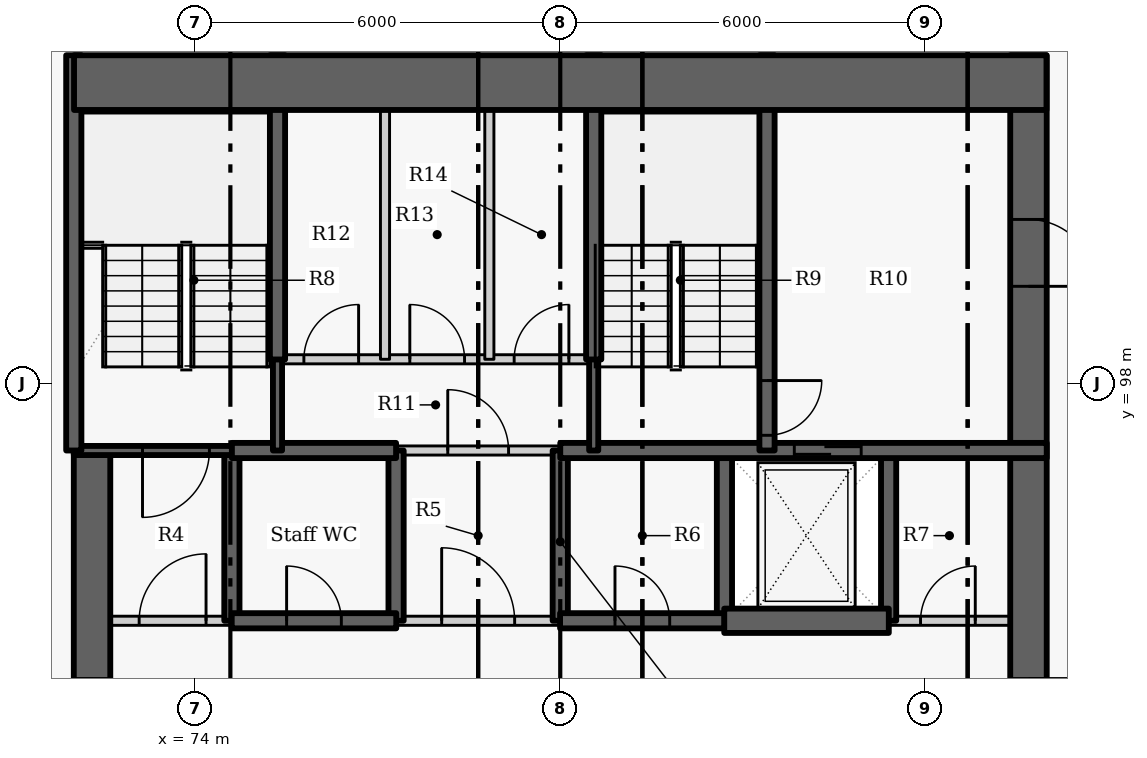
"""IFC4 building model, lengths in metres.
Left out: names, types, materials, properties, quantities, classifications, styles, units other than length and angle.
Written with IfcOpenShell. Run it as: python <this file> out.ifc"""

import sys

from ifc_helpers import new_model, si_unit, direction, frame, frame_2d, origin, place, context, subcontext, project, spatial, rectangle, extrude, element, fill, save


model = new_model("IFC4")
c1 = context("Model", 3, precision=1e-05, world=origin(), true_north=direction((0.0, 1.0)))
c2 = subcontext(c1, "Body", "Model", "MODEL_VIEW")
j1 = project(units=[si_unit("LENGTHUNIT", "METRE"), si_unit("PLANEANGLEUNIT", "RADIAN")], contexts=[c1])
p1 = place(None, origin())
s1 = spatial("IfcSite", under=j1, at=p1, CompositionType="ELEMENT")
p2 = place(p1, origin())
s2 = spatial("IfcBuilding", under=s1, at=p2, CompositionType="ELEMENT")
p3 = place(p2, frame((0.0, 0.0, 28.2)))
s3 = spatial("IfcBuildingStorey", under=s2, at=p3, CompositionType="ELEMENT", Elevation=28.2)
p4 = place(p3, frame((74.6, 94.1, -0.275), z_axis=(0.0, 0.0, 1.0), x_axis=(0.0, 1.0, 0.0)))
e1 = element("IfcWall", 1, at=p4, inside=s3, PredefinedType="SHEAR", context=c2, shape_type="SweptSolid", body=[
    extrude(rectangle(XDim=2.8, YDim=0.25, at=frame_2d((1.4, 0.0))), origin(), (0.0, 0.0, 1.0), 3.3),
])
p5 = place(p3, frame((72.3, 87.8, -0.275), z_axis=(0.0, 0.0, 1.0), x_axis=(0.0, 1.0, 0.0)))
e2 = element("IfcWall", 2, at=p5, inside=s3, PredefinedType="SHEAR", context=c2, shape_type="SweptSolid", body=[
    extrude(rectangle(XDim=9.1, YDim=0.6, at=frame_2d((4.55, 0.0))), origin(), (0.0, 0.0, 1.0), 3.3),
])
p6 = place(p5, frame((3.85, 0.0, 0.275)))
e3 = element("IfcOpeningElement", 3, at=p6, cuts=e2, PredefinedType="OPENING", context=c2, shape_type="SweptSolid", body=[
    extrude(rectangle(XDim=1.5, YDim=2.1, at=frame_2d((0.75, 1.05))), frame((0.0, 0.31, 0.0), z_axis=(0.0, -1.0, 0.0), x_axis=(1.0, 0.0, 0.0)), (0.0, 0.0, 1.0), 0.62),
])
for number, where, z_axis, x_axis in (
    (4, (77.3, 94.1, -0.275), (0.0, 0.0, 1.0), (0.0, 1.0, 0.0)),
    (5, (80.0, 94.1, -0.275), (0.0, 0.0, 1.0), (0.0, 1.0, 0.0)),
    (6, (82.7, 94.1, -0.275), (0.0, 0.0, 1.0), (0.0, 1.0, 0.0)),
    (7, (85.4, 94.1, -0.275), (0.0, 0.0, 1.0), (0.0, 1.0, 0.0)),
):
    element("IfcWall", number, at=place(p3, frame(where, z_axis=z_axis, x_axis=x_axis)), inside=s3, PredefinedType="SHEAR", context=c2, shape_type="SweptSolid", body=[
        extrude(rectangle(XDim=2.8, YDim=0.25, at=frame_2d((1.4, 0.0))), origin(), (0.0, 0.0, 1.0), 3.3),
    ])
p7 = place(p3, frame((87.7, 103.4, -0.275), z_axis=(0.0, 0.0, 1.0), x_axis=(0.0, -1.0, 0.0)))
e8 = element("IfcWall", 8, at=p7, inside=s3, PredefinedType="SHEAR", context=c2, shape_type="SweptSolid", body=[
    extrude(rectangle(XDim=15.6, YDim=0.6, at=frame_2d((7.8, 0.0))), origin(), (0.0, 0.0, 1.0), 3.3),
])
p8 = place(p7, frame((10.25, 0.0, 0.275)))
e9 = element("IfcOpeningElement", 9, at=p8, cuts=e8, PredefinedType="OPENING", context=c2, shape_type="SweptSolid", body=[
    extrude(rectangle(XDim=1.5, YDim=2.1, at=frame_2d((0.75, 1.05))), frame((0.0, 0.31, 0.0), z_axis=(0.0, -1.0, 0.0), x_axis=(1.0, 0.0, 0.0)), (0.0, 0.0, 1.0), 0.62),
])
p9 = place(p7, frame((2.7, 0.0, 0.275)))
e10 = element("IfcOpeningElement", 10, at=p9, cuts=e8, PredefinedType="OPENING", context=c2, shape_type="SweptSolid", body=[
    extrude(rectangle(XDim=1.1, YDim=2.1, at=frame_2d((0.55, 1.05))), frame((0.0, 0.31, 0.0), z_axis=(0.0, -1.0, 0.0), x_axis=(1.0, 0.0, 0.0)), (0.0, 0.0, 1.0), 0.62),
])
p10 = place(p3, frame((72.0, 94.1, 0.0), z_axis=(0.0, 0.0, 1.0), x_axis=(1.0, 0.0, 0.0)))
e11 = element("IfcWall", 11, at=p10, inside=s3, PredefinedType="PARTITIONING", context=c2, shape_type="SweptSolid", body=[
    extrude(rectangle(XDim=2.603, YDim=0.15, at=frame_2d((1.302, 0.0))), origin(), (0.0, 0.0, 1.0), 3.025),
])
p11 = place(p10, frame((1.075, 0.0, 0.0)))
e12 = element("IfcOpeningElement", 12, at=p11, cuts=e11, PredefinedType="OPENING", context=c2, shape_type="SweptSolid", body=[
    extrude(rectangle(XDim=1.1, YDim=2.1, at=frame_2d((0.55, 1.05))), frame((0.0, 0.085, 0.0), z_axis=(0.0, -1.0, 0.0), x_axis=(1.0, 0.0, 0.0)), (0.0, 0.0, 1.0), 0.17),
])
p12 = place(p3, frame((77.297, 94.1, 0.0), z_axis=(0.0, 0.0, 1.0), x_axis=(1.0, 0.0, 0.0)))
e13 = element("IfcWall", 13, at=p12, inside=s3, PredefinedType="PARTITIONING", context=c2, shape_type="SweptSolid", body=[
    extrude(rectangle(XDim=2.706, YDim=0.15, at=frame_2d((1.353, 0.0))), origin(), (0.0, 0.0, 1.0), 3.025),
])
p13 = place(p12, frame((0.753, 0.0, 0.0)))
e14 = element("IfcOpeningElement", 14, at=p13, cuts=e13, PredefinedType="OPENING", context=c2, shape_type="SweptSolid", body=[
    extrude(rectangle(XDim=1.2, YDim=2.1, at=frame_2d((0.6, 1.05))), frame((0.0, 0.085, 0.0), z_axis=(0.0, -1.0, 0.0), x_axis=(1.0, 0.0, 0.0)), (0.0, 0.0, 1.0), 0.17),
])
p14 = place(p3, frame((85.397, 94.1, 0.0), z_axis=(0.0, 0.0, 1.0), x_axis=(1.0, 0.0, 0.0)))
e15 = element("IfcWall", 15, at=p14, inside=s3, PredefinedType="PARTITIONING", context=c2, shape_type="SweptSolid", body=[
    extrude(rectangle(XDim=2.603, YDim=0.15, at=frame_2d((1.302, 0.0))), origin(), (0.0, 0.0, 1.0), 3.025),
])
p15 = place(p14, frame((0.528, 0.0, 0.0)))
e16 = element("IfcOpeningElement", 16, at=p15, cuts=e15, PredefinedType="OPENING", context=c2, shape_type="SweptSolid", body=[
    extrude(rectangle(XDim=0.9, YDim=2.1, at=frame_2d((0.45, 1.05))), frame((0.0, 0.085, 0.0), z_axis=(0.0, -1.0, 0.0), x_axis=(1.0, 0.0, 0.0)), (0.0, 0.0, 1.0), 0.17),
])
p16 = place(p3, frame((74.597, 94.1, -0.275), z_axis=(0.0, 0.0, 1.0), x_axis=(1.0, 0.0, 0.0)))
e17 = element("IfcWall", 17, at=p16, inside=s3, PredefinedType="SHEAR", context=c2, shape_type="SweptSolid", body=[
    extrude(rectangle(XDim=2.706, YDim=0.25, at=frame_2d((1.353, 0.0))), origin(), (0.0, 0.0, 1.0), 3.3),
])
p17 = place(p16, frame((0.903, 0.0, 0.275)))
e18 = element("IfcOpeningElement", 18, at=p17, cuts=e17, PredefinedType="OPENING", context=c2, shape_type="SweptSolid", body=[
    extrude(rectangle(XDim=0.9, YDim=2.1, at=frame_2d((0.45, 1.05))), frame((0.0, 0.135, 0.0), z_axis=(0.0, -1.0, 0.0), x_axis=(1.0, 0.0, 0.0)), (0.0, 0.0, 1.0), 0.27),
])
p18 = place(p3, frame((79.997, 94.1, -0.275), z_axis=(0.0, 0.0, 1.0), x_axis=(1.0, 0.0, 0.0)))
e19 = element("IfcWall", 19, at=p18, inside=s3, PredefinedType="SHEAR", context=c2, shape_type="SweptSolid", body=[
    extrude(rectangle(XDim=2.706, YDim=0.25, at=frame_2d((1.353, 0.0))), origin(), (0.0, 0.0, 1.0), 3.3),
])
p19 = place(p18, frame((0.903, 0.0, 0.275)))
e20 = element("IfcOpeningElement", 20, at=p19, cuts=e19, PredefinedType="OPENING", context=c2, shape_type="SweptSolid", body=[
    extrude(rectangle(XDim=0.9, YDim=2.1, at=frame_2d((0.45, 1.05))), frame((0.0, 0.135, 0.0), z_axis=(0.0, -1.0, 0.0), x_axis=(1.0, 0.0, 0.0)), (0.0, 0.0, 1.0), 0.27),
])
p20 = place(p3, frame((82.697, 94.1, -0.275), z_axis=(0.0, 0.0, 1.0), x_axis=(1.0, 0.0, 0.0)))
e21 = element("IfcWall", 21, at=p20, inside=s3, PredefinedType="SHEAR", context=c2, shape_type="SweptSolid", body=[
    extrude(rectangle(XDim=2.706, YDim=0.4, at=frame_2d((1.353, 0.0))), origin(), (0.0, 0.0, 1.0), 3.3),
])
p21 = place(p3, frame((74.6, 96.9, -0.275), z_axis=(0.0, 0.0, 1.0), x_axis=(-1.0, 0.0, 0.0)))
e22 = element("IfcWall", 22, at=p21, inside=s3, PredefinedType="SHEAR", context=c2, shape_type="SweptSolid", body=[
    extrude(rectangle(XDim=2.6, YDim=0.15, at=frame_2d((1.3, 0.0))), origin(), (0.0, 0.0, 1.0), 3.3),
])
p22 = place(p21, frame((0.37, 0.0, 0.275)))
e23 = element("IfcOpeningElement", 23, at=p22, cuts=e22, PredefinedType="OPENING", context=c2, shape_type="SweptSolid", body=[
    extrude(rectangle(XDim=1.1, YDim=2.1, at=frame_2d((0.55, 1.05))), frame((0.0, 0.085, 0.0), z_axis=(0.0, -1.0, 0.0), x_axis=(1.0, 0.0, 0.0)), (0.0, 0.0, 1.0), 0.17),
])
p23 = place(p3, frame((74.6, 96.9, -0.275), z_axis=(0.0, 0.0, 1.0), x_axis=(1.0, 0.0, 0.0)))
e24 = element("IfcWall", 24, at=p23, inside=s3, PredefinedType="SHEAR", context=c2, shape_type="SweptSolid", body=[
    extrude(rectangle(XDim=2.7, YDim=0.25, at=frame_2d((1.35, 0.0))), origin(), (0.0, 0.0, 1.0), 3.3),
])
p24 = place(p3, frame((80.0, 96.9, -0.275), z_axis=(0.0, 0.0, 1.0), x_axis=(1.0, 0.0, 0.0)))
e25 = element("IfcWall", 25, at=p24, inside=s3, PredefinedType="SHEAR", context=c2, shape_type="SweptSolid", body=[
    extrude(rectangle(XDim=8.0, YDim=0.25, at=frame_2d((4.0, 0.0))), origin(), (0.0, 0.0, 1.0), 3.3),
])
p25 = place(p24, frame((3.849, 0.0, 0.275)))
e26 = element("IfcOpeningElement", 26, at=p25, cuts=e25, PredefinedType="OPENING", context=c2, shape_type="SweptSolid", body=[
    extrude(rectangle(XDim=1.1, YDim=2.1, at=frame_2d((0.55, 1.05))), frame((0.0, 0.135, 0.0), z_axis=(0.0, -1.0, 0.0), x_axis=(1.0, 0.0, 0.0)), (0.0, 0.0, 1.0), 0.27),
])
p26 = place(p3, frame((77.3, 96.9, 0.0), z_axis=(0.0, 0.0, 1.0), x_axis=(1.0, 0.0, 0.0)))
e27 = element("IfcWall", 27, at=p26, inside=s3, PredefinedType="PARTITIONING", context=c2, shape_type="SweptSolid", body=[
    extrude(rectangle(XDim=2.7, YDim=0.15, at=frame_2d((1.35, 0.0))), origin(), (0.0, 0.0, 1.0), 3.025),
])
p27 = place(p26, frame((0.85, 0.0, 0.0)))
e28 = element("IfcOpeningElement", 28, at=p27, cuts=e27, PredefinedType="OPENING", context=c2, shape_type="SweptSolid", body=[
    extrude(rectangle(XDim=1.0, YDim=2.1, at=frame_2d((0.5, 1.05))), frame((0.0, 0.085, 0.0), z_axis=(0.0, -1.0, 0.0), x_axis=(1.0, 0.0, 0.0)), (0.0, 0.0, 1.0), 0.17),
])
p28 = place(p3, frame((75.35, 96.9, -0.275), z_axis=(0.0, 0.0, 1.0), x_axis=(0.0, 1.0, 0.0)))
e29 = element("IfcWall", 29, at=p28, inside=s3, PredefinedType="SHEAR", context=c2, shape_type="SweptSolid", body=[
    extrude(rectangle(XDim=1.503, YDim=0.15, at=frame_2d((0.751, 0.0))), origin(), (0.0, 0.0, 1.0), 3.3),
])
p29 = place(p3, frame((75.35, 98.397, -0.275), z_axis=(0.0, 0.0, 1.0), x_axis=(0.0, 1.0, 0.0)))
e30 = element("IfcWall", 30, at=p29, inside=s3, PredefinedType="SHEAR", context=c2, shape_type="SweptSolid", body=[
    extrude(rectangle(XDim=5.003, YDim=0.25, at=frame_2d((2.501, 0.0))), origin(), (0.0, 0.0, 1.0), 3.3),
])
p30 = place(p3, frame((72.0, 96.9, -0.275), z_axis=(0.0, 0.0, 1.0), x_axis=(0.0, 1.0, 0.0)))
e31 = element("IfcWall", 31, at=p30, inside=s3, PredefinedType="SHEAR", context=c2, shape_type="SweptSolid", body=[
    extrude(rectangle(XDim=6.5, YDim=0.25, at=frame_2d((3.25, 0.0))), origin(), (0.0, 0.0, 1.0), 3.3),
])
p31 = place(p3, frame((83.4, 103.4, -0.275), z_axis=(0.0, 0.0, 1.0), x_axis=(0.0, -1.0, 0.0)))
e32 = element("IfcWall", 32, at=p31, inside=s3, PredefinedType="SHEAR", context=c2, shape_type="SweptSolid", body=[
    extrude(rectangle(XDim=6.5, YDim=0.25, at=frame_2d((3.25, 0.0))), origin(), (0.0, 0.0, 1.0), 3.3),
])
p32 = place(p31, frame((5.35, 0.0, 0.275)))
e33 = element("IfcOpeningElement", 33, at=p32, cuts=e32, PredefinedType="OPENING", context=c2, shape_type="SweptSolid", body=[
    extrude(rectangle(XDim=0.9, YDim=2.1, at=frame_2d((0.45, 1.05))), frame((0.0, 0.135, 0.0), z_axis=(0.0, -1.0, 0.0), x_axis=(1.0, 0.0, 0.0)), (0.0, 0.0, 1.0), 0.27),
])
p33 = place(p3, frame((80.55, 96.9, -0.275), z_axis=(0.0, 0.0, 1.0), x_axis=(0.0, 1.0, 0.0)))
e34 = element("IfcWall", 34, at=p33, inside=s3, PredefinedType="SHEAR", context=c2, shape_type="SweptSolid", body=[
    extrude(rectangle(XDim=1.503, YDim=0.15, at=frame_2d((0.751, 0.0))), origin(), (0.0, 0.0, 1.0), 3.3),
])
p34 = place(p3, frame((80.55, 98.397, -0.275), z_axis=(0.0, 0.0, 1.0), x_axis=(0.0, 1.0, 0.0)))
e35 = element("IfcWall", 35, at=p34, inside=s3, PredefinedType="SHEAR", context=c2, shape_type="SweptSolid", body=[
    extrude(rectangle(XDim=5.003, YDim=0.25, at=frame_2d((2.501, 0.0))), origin(), (0.0, 0.0, 1.0), 3.3),
])
p35 = place(p3, frame((75.35, 98.4, 0.0), z_axis=(0.0, 0.0, 1.0), x_axis=(1.0, 0.0, 0.0)))
e36 = element("IfcWall", 36, at=p35, inside=s3, PredefinedType="PARTITIONING", context=c2, shape_type="SweptSolid", body=[
    extrude(rectangle(XDim=5.2, YDim=0.15, at=frame_2d((2.6, 0.0))), origin(), (0.0, 0.0, 1.0), 3.025),
])
p36 = place(p35, frame((0.434, 0.0, 0.0)))
e37 = element("IfcOpeningElement", 37, at=p36, cuts=e36, PredefinedType="OPENING", context=c2, shape_type="SweptSolid", body=[
    extrude(rectangle(XDim=0.9, YDim=2.1, at=frame_2d((0.45, 1.05))), frame((0.0, 0.085, 0.0), z_axis=(0.0, -1.0, 0.0), x_axis=(1.0, 0.0, 0.0)), (0.0, 0.0, 1.0), 0.17),
])
p37 = place(p35, frame((2.176, 0.0, 0.0)))
e38 = element("IfcOpeningElement", 38, at=p37, cuts=e36, PredefinedType="OPENING", context=c2, shape_type="SweptSolid", body=[
    extrude(rectangle(XDim=0.9, YDim=2.1, at=frame_2d((0.45, 1.05))), frame((0.0, 0.085, 0.0), z_axis=(0.0, -1.0, 0.0), x_axis=(1.0, 0.0, 0.0)), (0.0, 0.0, 1.0), 0.17),
])
p38 = place(p35, frame((3.892, 0.0, 0.0)))
e39 = element("IfcOpeningElement", 39, at=p38, cuts=e36, PredefinedType="OPENING", context=c2, shape_type="SweptSolid", body=[
    extrude(rectangle(XDim=0.9, YDim=2.1, at=frame_2d((0.45, 1.05))), frame((0.0, 0.085, 0.0), z_axis=(0.0, -1.0, 0.0), x_axis=(1.0, 0.0, 0.0)), (0.0, 0.0, 1.0), 0.17),
])
for number, where, z_axis, x_axis in (
    (40, (77.118, 98.4, 0.0), (0.0, 0.0, 1.0), (0.0, 1.0, 0.0)),
    (41, (78.834, 98.4, 0.0), (0.0, 0.0, 1.0), (0.0, 1.0, 0.0)),
):
    element("IfcWall", number, at=place(p3, frame(where, z_axis=z_axis, x_axis=x_axis)), inside=s3, PredefinedType="PARTITIONING", context=c2, shape_type="SweptSolid", body=[
        extrude(rectangle(XDim=5.0, YDim=0.15, at=frame_2d((2.5, 0.0))), origin(), (0.0, 0.0, 1.0), 3.025),
    ])
p39 = place(p3, frame((72.004, 102.95, -0.275), z_axis=(0.0, 0.0, 1.0), x_axis=(1.0, 0.0, 0.0)))
e42 = element("IfcWall", 42, at=p39, inside=s3, PredefinedType="SHEAR", context=c2, shape_type="SweptSolid", body=[
    extrude(rectangle(XDim=15.992, YDim=0.9, at=frame_2d((7.996, 0.0))), origin(), (0.0, 0.0, 1.0), 3.3),
])
p40 = place(p11, origin())
e43 = element("IfcDoor", 43, at=p40, inside=s3, OperationType="SINGLE_SWING_RIGHT", PredefinedType="DOOR", context=c2, shape_type="SweptSolid", body=[
    extrude(rectangle(XDim=1.1, YDim=2.1, at=frame_2d((0.55, 1.05))), frame((0.0, 0.025, 0.0), z_axis=(0.0, -1.0, 0.0), x_axis=(1.0, 0.0, 0.0)), (0.0, 0.0, 1.0), 0.05),
])
fill(e12, e43)
p41 = place(p17, origin())
e44 = element("IfcDoor", 44, at=p41, inside=s3, OperationType="SINGLE_SWING_LEFT", PredefinedType="DOOR", context=c2, shape_type="SweptSolid", body=[
    extrude(rectangle(XDim=0.9, YDim=2.1, at=frame_2d((0.45, 1.05))), frame((0.0, 0.025, 0.0), z_axis=(0.0, -1.0, 0.0), x_axis=(1.0, 0.0, 0.0)), (0.0, 0.0, 1.0), 0.05),
])
fill(e18, e44)
p42 = place(p13, origin())
e45 = element("IfcDoor", 45, at=p42, inside=s3, OperationType="DOUBLE_DOOR_SINGLE_SWING", PredefinedType="DOOR", context=c2, shape_type="SweptSolid", body=[
    extrude(rectangle(XDim=1.2, YDim=2.1, at=frame_2d((0.6, 1.05))), frame((0.0, 0.025, 0.0), z_axis=(0.0, -1.0, 0.0), x_axis=(1.0, 0.0, 0.0)), (0.0, 0.0, 1.0), 0.05),
])
fill(e14, e45)
p43 = place(p19, origin())
e46 = element("IfcDoor", 46, at=p43, inside=s3, OperationType="SINGLE_SWING_LEFT", PredefinedType="DOOR", context=c2, shape_type="SweptSolid", body=[
    extrude(rectangle(XDim=0.9, YDim=2.1, at=frame_2d((0.45, 1.05))), frame((0.0, 0.025, 0.0), z_axis=(0.0, -1.0, 0.0), x_axis=(1.0, 0.0, 0.0)), (0.0, 0.0, 1.0), 0.05),
])
fill(e20, e46)
p44 = place(p25, origin())
e47 = element("IfcDoor", 47, at=p44, inside=s3, OperationType="SLIDING_TO_LEFT", PredefinedType="DOOR", context=c2, shape_type="SweptSolid", body=[
    extrude(rectangle(XDim=1.1, YDim=2.1, at=frame_2d((0.55, 1.05))), frame((0.0, 0.025, 0.0), z_axis=(0.0, -1.0, 0.0), x_axis=(1.0, 0.0, 0.0)), (0.0, 0.0, 1.0), 0.05),
])
fill(e26, e47)
p45 = place(p15, origin())
e48 = element("IfcDoor", 48, at=p45, inside=s3, OperationType="SINGLE_SWING_RIGHT", PredefinedType="DOOR", context=c2, shape_type="SweptSolid", body=[
    extrude(rectangle(XDim=0.9, YDim=2.1, at=frame_2d((0.45, 1.05))), frame((0.0, 0.025, 0.0), z_axis=(0.0, -1.0, 0.0), x_axis=(1.0, 0.0, 0.0)), (0.0, 0.0, 1.0), 0.05),
])
fill(e16, e48)
p46 = place(p27, origin())
e49 = element("IfcDoor", 49, at=p46, inside=s3, OperationType="SINGLE_SWING_LEFT", PredefinedType="DOOR", context=c2, shape_type="SweptSolid", body=[
    extrude(rectangle(XDim=1.0, YDim=2.1, at=frame_2d((0.5, 1.05))), frame((0.0, 0.025, 0.0), z_axis=(0.0, -1.0, 0.0), x_axis=(1.0, 0.0, 0.0)), (0.0, 0.0, 1.0), 0.05),
])
fill(e28, e49)
p47 = place(p36, origin())
e50 = element("IfcDoor", 50, at=p47, inside=s3, OperationType="SINGLE_SWING_RIGHT", PredefinedType="DOOR", context=c2, shape_type="SweptSolid", body=[
    extrude(rectangle(XDim=0.9, YDim=2.1, at=frame_2d((0.45, 1.05))), frame((0.0, 0.025, 0.0), z_axis=(0.0, -1.0, 0.0), x_axis=(1.0, 0.0, 0.0)), (0.0, 0.0, 1.0), 0.05),
])
fill(e37, e50)
p48 = place(p37, origin())
e51 = element("IfcDoor", 51, at=p48, inside=s3, OperationType="SINGLE_SWING_LEFT", PredefinedType="DOOR", context=c2, shape_type="SweptSolid", body=[
    extrude(rectangle(XDim=0.9, YDim=2.1, at=frame_2d((0.45, 1.05))), frame((0.0, 0.025, 0.0), z_axis=(0.0, -1.0, 0.0), x_axis=(1.0, 0.0, 0.0)), (0.0, 0.0, 1.0), 0.05),
])
fill(e38, e51)
p49 = place(p38, origin())
e52 = element("IfcDoor", 52, at=p49, inside=s3, OperationType="SINGLE_SWING_RIGHT", PredefinedType="DOOR", context=c2, shape_type="SweptSolid", body=[
    extrude(rectangle(XDim=0.9, YDim=2.1, at=frame_2d((0.45, 1.05))), frame((0.0, 0.025, 0.0), z_axis=(0.0, -1.0, 0.0), x_axis=(1.0, 0.0, 0.0)), (0.0, 0.0, 1.0), 0.05),
])
fill(e39, e52)
p50 = place(p22, origin())
e53 = element("IfcDoor", 53, at=p50, inside=s3, OperationType="SINGLE_SWING_RIGHT", PredefinedType="DOOR", context=c2, shape_type="SweptSolid", body=[
    extrude(rectangle(XDim=1.1, YDim=2.1, at=frame_2d((0.55, 1.05))), frame((0.0, 0.025, 0.0), z_axis=(0.0, -1.0, 0.0), x_axis=(1.0, 0.0, 0.0)), (0.0, 0.0, 1.0), 0.05),
])
fill(e23, e53)
p51 = place(p32, origin())
e54 = element("IfcDoor", 54, at=p51, inside=s3, OperationType="SINGLE_SWING_LEFT", PredefinedType="DOOR", context=c2, shape_type="SweptSolid", body=[
    extrude(rectangle(XDim=0.9, YDim=2.1, at=frame_2d((0.45, 1.05))), frame((0.0, 0.025, 0.0), z_axis=(0.0, -1.0, 0.0), x_axis=(1.0, 0.0, 0.0)), (0.0, 0.0, 1.0), 0.05),
])
fill(e33, e54)
p52 = place(p6, origin())
e55 = element("IfcDoor", 55, at=p52, inside=s3, OperationType="DOUBLE_DOOR_SINGLE_SWING", PredefinedType="DOOR", context=c2, shape_type="SweptSolid", body=[
    extrude(rectangle(XDim=1.5, YDim=2.1, at=frame_2d((0.75, 1.05))), frame((0.0, 0.025, 0.0), z_axis=(0.0, -1.0, 0.0), x_axis=(1.0, 0.0, 0.0)), (0.0, 0.0, 1.0), 0.05),
])
fill(e3, e55)
p53 = place(p9, origin())
e56 = element("IfcDoor", 56, at=p53, inside=s3, OperationType="SINGLE_SWING_RIGHT", PredefinedType="DOOR", context=c2, shape_type="SweptSolid", body=[
    extrude(rectangle(XDim=1.1, YDim=2.1, at=frame_2d((0.55, 1.05))), frame((0.0, 0.025, 0.0), z_axis=(0.0, -1.0, 0.0), x_axis=(1.0, 0.0, 0.0)), (0.0, 0.0, 1.0), 0.05),
])
fill(e10, e56)
save(model, sys.argv[1])
